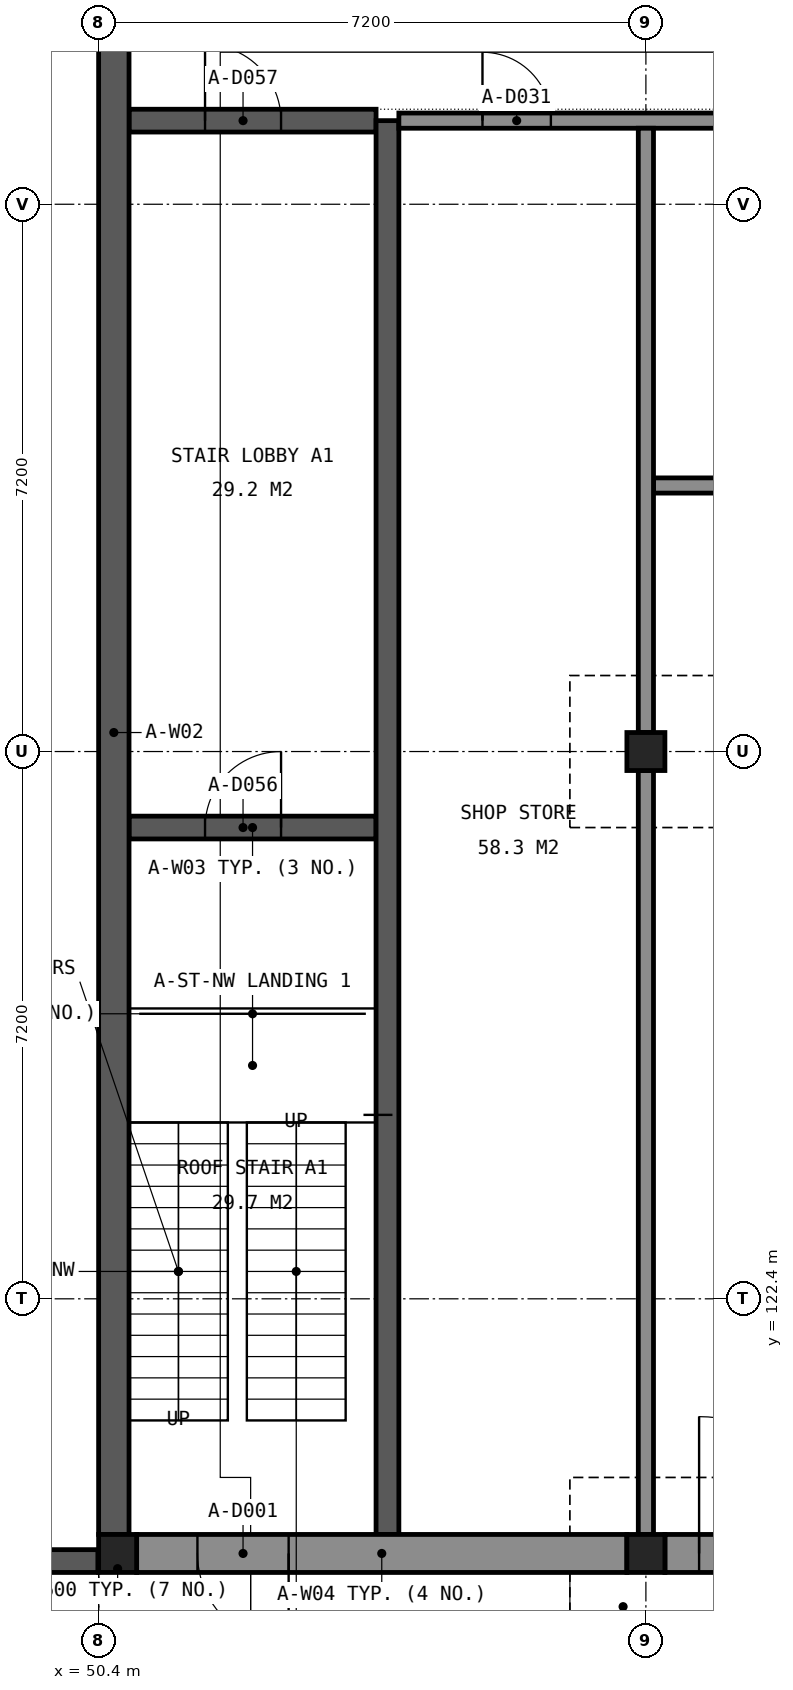
"""IFC4 building model, lengths in metres.
Left out: names, types, materials, properties, quantities, classifications, styles, units other than length and angle.
Written with IfcOpenShell. Run it as: python <this file> out.ifc"""

import sys

from ifc_helpers import new_model, si_unit, direction, frame, frame_2d, origin, origin_2d, place, context, subcontext, project, spatial, rectangle, extrude, element, fill, save


model = new_model("IFC4")
c1 = context("Model", 3, precision=1e-05, world=origin(), true_north=direction((0.0, 1.0)))
c2 = subcontext(c1, "Body", "Model", "MODEL_VIEW")
j1 = project(units=[si_unit("LENGTHUNIT", "METRE"), si_unit("PLANEANGLEUNIT", "RADIAN")], contexts=[c1])
p1 = place(None, origin())
s1 = spatial("IfcSite", under=j1, at=p1, CompositionType="ELEMENT")
p2 = place(p1, origin())
s2 = spatial("IfcBuilding", under=s1, at=p2, CompositionType="ELEMENT")
p3 = place(p2, origin())
s3 = spatial("IfcBuildingStorey", under=s2, at=p3, CompositionType="ELEMENT", Elevation=0.0)
for number, where, z_axis, x_axis in (
    (1, (50.65, 119.05, 0.0), (0.0, 0.0, 1.0), (1.0, 0.0, 0.0)),
    (2, (57.6, 119.05, 0.0), (0.0, 0.0, 1.0), (1.0, 0.0, 0.0)),
    (3, (57.6, 129.6, 0.0), (0.0, 0.0, 1.0), (1.0, 0.0, 0.0)),
):
    element("IfcColumn", number, at=place(p3, frame(where, z_axis=z_axis, x_axis=x_axis)), inside=s3, PredefinedType="COLUMN", context=c2, shape_type="SweptSolid", body=[
        extrude(rectangle(XDim=0.5, YDim=0.5, at=origin_2d()), origin(), (0.0, 0.0, 1.0), 3.7),
    ])
p4 = place(p3, frame((50.8, 128.6, 0.0), z_axis=(0.0, 0.0, 1.0), x_axis=(1.0, 0.0, 0.0)))
e4 = element("IfcWall", 4, at=p4, inside=s3, PredefinedType="SHEAR", context=c2, shape_type="SweptSolid", body=[
    extrude(rectangle(XDim=3.25, YDim=0.3, at=frame_2d((1.625, 0.0))), origin(), (0.0, 0.0, 1.0), 4.4),
])
p5 = place(p4, frame((1.0, 0.0, 0.0)))
e5 = element("IfcOpeningElement", 5, at=p5, cuts=e4, PredefinedType="OPENING", context=c2, shape_type="SweptSolid", body=[
    extrude(rectangle(XDim=1.0, YDim=2.1, at=frame_2d((0.5, 1.05))), frame((0.0, 0.16, 0.0), z_axis=(0.0, -1.0, 0.0), x_axis=(1.0, 0.0, 0.0)), (0.0, 0.0, 1.0), 0.32),
])
p6 = place(p3, frame((50.8, 137.9, 0.0), z_axis=(0.0, 0.0, 1.0), x_axis=(1.0, 0.0, 0.0)))
e6 = element("IfcWall", 6, at=p6, inside=s3, PredefinedType="SHEAR", context=c2, shape_type="SweptSolid", body=[
    extrude(rectangle(XDim=3.25, YDim=0.3, at=frame_2d((1.625, 0.0))), origin(), (0.0, 0.0, 1.0), 4.4),
])
p7 = place(p6, frame((1.0, 0.0, 0.0)))
e7 = element("IfcOpeningElement", 7, at=p7, cuts=e6, PredefinedType="OPENING", context=c2, shape_type="SweptSolid", body=[
    extrude(rectangle(XDim=1.0, YDim=2.1, at=frame_2d((0.5, 1.05))), frame((0.0, 0.16, 0.0), z_axis=(0.0, -1.0, 0.0), x_axis=(1.0, 0.0, 0.0)), (0.0, 0.0, 1.0), 0.32),
])
p8 = place(p3, frame((50.6, 119.3, 0.0), z_axis=(0.0, 0.0, 1.0), x_axis=(0.0, 1.0, 0.0)))
e8 = element("IfcWall", 8, at=p8, inside=s3, PredefinedType="SHEAR", context=c2, shape_type="SweptSolid", body=[
    extrude(rectangle(XDim=21.1, YDim=0.4, at=frame_2d((10.55, 0.0))), origin(), (0.0, 0.0, 1.0), 4.4),
])
p9 = place(p3, frame((54.2, 119.3, 0.0), z_axis=(0.0, 0.0, 1.0), x_axis=(0.0, 1.0, 0.0)))
e9 = element("IfcWall", 9, at=p9, inside=s3, PredefinedType="SHEAR", context=c2, shape_type="SweptSolid", body=[
    extrude(rectangle(XDim=18.6, YDim=0.3, at=frame_2d((9.3, 0.0))), origin(), (0.0, 0.0, 1.0), 4.4),
])
p10 = place(p3, frame((43.21, 118.95, -0.25), z_axis=(0.0, 0.0, 1.0), x_axis=(1.0, 0.0, 0.0)))
e10 = element("IfcWall", 10, at=p10, inside=s3, PredefinedType="SOLIDWALL", context=c2, shape_type="SweptSolid", body=[
    extrude(rectangle(XDim=7.18, YDim=0.3, at=frame_2d((3.59, 0.0))), origin(), (0.0, 0.0, 1.0), 6.15),
])
p11 = place(p3, frame((50.9, 119.05, 0.0), z_axis=(0.0, 0.0, 1.0), x_axis=(1.0, 0.0, 0.0)))
e11 = element("IfcWall", 11, at=p11, inside=s3, PredefinedType="SOLIDWALL", context=c2, shape_type="SweptSolid", body=[
    extrude(rectangle(XDim=6.45, YDim=0.5, at=frame_2d((3.225, 0.0))), origin(), (0.0, 0.0, 1.0), 3.6),
])
p12 = place(p11, frame((2.0, 0.0, 0.0), z_axis=(0.0, 0.0, 1.0), x_axis=(-1.0, 0.0, 0.0)))
e12 = element("IfcOpeningElement", 12, at=p12, cuts=e11, PredefinedType="OPENING", context=c2, shape_type="SweptSolid", body=[
    extrude(rectangle(XDim=1.2, YDim=2.1, at=frame_2d((0.6, 1.05))), frame((0.0, 0.26, 0.0), z_axis=(0.0, -1.0, 0.0), x_axis=(1.0, 0.0, 0.0)), (0.0, 0.0, 1.0), 0.52),
])
p13 = place(p3, frame((57.85, 119.05, 0.0), z_axis=(0.0, 0.0, 1.0), x_axis=(1.0, 0.0, 0.0)))
e13 = element("IfcWall", 13, at=p13, inside=s3, PredefinedType="SOLIDWALL", context=c2, shape_type="SweptSolid", body=[
    extrude(rectangle(XDim=6.7, YDim=0.5, at=frame_2d((3.35, 0.0))), origin(), (0.0, 0.0, 1.0), 3.6),
])
p14 = place(p13, frame((0.45, 0.0, 0.0)))
e14 = element("IfcOpeningElement", 14, at=p14, cuts=e13, PredefinedType="OPENING", context=c2, shape_type="SweptSolid", body=[
    extrude(rectangle(XDim=1.8, YDim=2.4, at=frame_2d((0.9, 1.2))), frame((0.0, 0.26, 0.0), z_axis=(0.0, -1.0, 0.0), x_axis=(1.0, 0.0, 0.0)), (0.0, 0.0, 1.0), 0.52),
])
p15 = place(p13, frame((2.6, 0.0, 0.6)))
e15 = element("IfcOpeningElement", 15, at=p15, cuts=e13, PredefinedType="OPENING", context=c2, shape_type="SweptSolid", body=[
    extrude(rectangle(XDim=3.0, YDim=2.4, at=frame_2d((1.5, 1.2))), frame((0.0, 0.26, 0.0), z_axis=(0.0, -1.0, 0.0), x_axis=(1.0, 0.0, 0.0)), (0.0, 0.0, 1.0), 0.52),
])
p16 = place(p3, frame((57.7, 133.1, 0.0), z_axis=(0.0, 0.0, 1.0), x_axis=(1.0, 0.0, 0.0)))
e16 = element("IfcWall", 16, at=p16, inside=s3, PredefinedType="PARTITIONING", context=c2, shape_type="SweptSolid", body=[
    extrude(rectangle(XDim=86.2, YDim=0.2, at=frame_2d((43.1, 0.0))), origin(), (0.0, 0.0, 1.0), 3.5),
])
p17 = place(p16, frame((3.0, 0.0, 0.0)))
e17 = element("IfcOpeningElement", 17, at=p17, cuts=e16, PredefinedType="OPENING", context=c2, shape_type="SweptSolid", body=[
    extrude(rectangle(XDim=1.0, YDim=2.1, at=frame_2d((0.5, 1.05))), frame((0.0, 0.11, 0.0), z_axis=(0.0, -1.0, 0.0), x_axis=(1.0, 0.0, 0.0)), (0.0, 0.0, 1.0), 0.22),
])
p18 = place(p16, frame((10.2, 0.0, 0.0)))
e18 = element("IfcOpeningElement", 18, at=p18, cuts=e16, PredefinedType="OPENING", context=c2, shape_type="SweptSolid", body=[
    extrude(rectangle(XDim=1.0, YDim=2.1, at=frame_2d((0.5, 1.05))), frame((0.0, 0.11, 0.0), z_axis=(0.0, -1.0, 0.0), x_axis=(1.0, 0.0, 0.0)), (0.0, 0.0, 1.0), 0.22),
])
p19 = place(p16, frame((17.4, 0.0, 0.0)))
e19 = element("IfcOpeningElement", 19, at=p19, cuts=e16, PredefinedType="OPENING", context=c2, shape_type="SweptSolid", body=[
    extrude(rectangle(XDim=1.0, YDim=2.1, at=frame_2d((0.5, 1.05))), frame((0.0, 0.11, 0.0), z_axis=(0.0, -1.0, 0.0), x_axis=(1.0, 0.0, 0.0)), (0.0, 0.0, 1.0), 0.22),
])
p20 = place(p16, frame((24.6, 0.0, 0.0)))
e20 = element("IfcOpeningElement", 20, at=p20, cuts=e16, PredefinedType="OPENING", context=c2, shape_type="SweptSolid", body=[
    extrude(rectangle(XDim=1.0, YDim=2.1, at=frame_2d((0.5, 1.05))), frame((0.0, 0.11, 0.0), z_axis=(0.0, -1.0, 0.0), x_axis=(1.0, 0.0, 0.0)), (0.0, 0.0, 1.0), 0.22),
])
p21 = place(p16, frame((31.8, 0.0, 0.0)))
e21 = element("IfcOpeningElement", 21, at=p21, cuts=e16, PredefinedType="OPENING", context=c2, shape_type="SweptSolid", body=[
    extrude(rectangle(XDim=1.0, YDim=2.1, at=frame_2d((0.5, 1.05))), frame((0.0, 0.11, 0.0), z_axis=(0.0, -1.0, 0.0), x_axis=(1.0, 0.0, 0.0)), (0.0, 0.0, 1.0), 0.22),
])
p22 = place(p16, frame((39.0, 0.0, 0.0)))
e22 = element("IfcOpeningElement", 22, at=p22, cuts=e16, PredefinedType="OPENING", context=c2, shape_type="SweptSolid", body=[
    extrude(rectangle(XDim=1.0, YDim=2.1, at=frame_2d((0.5, 1.05))), frame((0.0, 0.11, 0.0), z_axis=(0.0, -1.0, 0.0), x_axis=(1.0, 0.0, 0.0)), (0.0, 0.0, 1.0), 0.22),
])
p23 = place(p16, frame((46.2, 0.0, 0.0)))
e23 = element("IfcOpeningElement", 23, at=p23, cuts=e16, PredefinedType="OPENING", context=c2, shape_type="SweptSolid", body=[
    extrude(rectangle(XDim=1.0, YDim=2.1, at=frame_2d((0.5, 1.05))), frame((0.0, 0.11, 0.0), z_axis=(0.0, -1.0, 0.0), x_axis=(1.0, 0.0, 0.0)), (0.0, 0.0, 1.0), 0.22),
])
p24 = place(p16, frame((53.4, 0.0, 0.0)))
e24 = element("IfcOpeningElement", 24, at=p24, cuts=e16, PredefinedType="OPENING", context=c2, shape_type="SweptSolid", body=[
    extrude(rectangle(XDim=1.0, YDim=2.1, at=frame_2d((0.5, 1.05))), frame((0.0, 0.11, 0.0), z_axis=(0.0, -1.0, 0.0), x_axis=(1.0, 0.0, 0.0)), (0.0, 0.0, 1.0), 0.22),
])
p25 = place(p16, frame((60.6, 0.0, 0.0)))
e25 = element("IfcOpeningElement", 25, at=p25, cuts=e16, PredefinedType="OPENING", context=c2, shape_type="SweptSolid", body=[
    extrude(rectangle(XDim=1.0, YDim=2.1, at=frame_2d((0.5, 1.05))), frame((0.0, 0.11, 0.0), z_axis=(0.0, -1.0, 0.0), x_axis=(1.0, 0.0, 0.0)), (0.0, 0.0, 1.0), 0.22),
])
p26 = place(p16, frame((67.8, 0.0, 0.0)))
e26 = element("IfcOpeningElement", 26, at=p26, cuts=e16, PredefinedType="OPENING", context=c2, shape_type="SweptSolid", body=[
    extrude(rectangle(XDim=1.0, YDim=2.1, at=frame_2d((0.5, 1.05))), frame((0.0, 0.11, 0.0), z_axis=(0.0, -1.0, 0.0), x_axis=(1.0, 0.0, 0.0)), (0.0, 0.0, 1.0), 0.22),
])
p27 = place(p16, frame((75.0, 0.0, 0.0)))
e27 = element("IfcOpeningElement", 27, at=p27, cuts=e16, PredefinedType="OPENING", context=c2, shape_type="SweptSolid", body=[
    extrude(rectangle(XDim=1.0, YDim=2.1, at=frame_2d((0.5, 1.05))), frame((0.0, 0.11, 0.0), z_axis=(0.0, -1.0, 0.0), x_axis=(1.0, 0.0, 0.0)), (0.0, 0.0, 1.0), 0.22),
])
p28 = place(p16, frame((84.65, 0.0, 0.0)))
e28 = element("IfcOpeningElement", 28, at=p28, cuts=e16, PredefinedType="OPENING", context=c2, shape_type="SweptSolid", body=[
    extrude(rectangle(XDim=0.9, YDim=2.1, at=frame_2d((0.45, 1.05))), frame((0.0, 0.11, 0.0), z_axis=(0.0, -1.0, 0.0), x_axis=(1.0, 0.0, 0.0)), (0.0, 0.0, 1.0), 0.22),
])
p29 = place(p3, frame((54.35, 137.9, 0.0), z_axis=(0.0, 0.0, 1.0), x_axis=(1.0, 0.0, 0.0)))
e29 = element("IfcWall", 29, at=p29, inside=s3, PredefinedType="PARTITIONING", context=c2, shape_type="SweptSolid", body=[
    extrude(rectangle(XDim=92.9, YDim=0.2, at=frame_2d((46.45, 0.0))), origin(), (0.0, 0.0, 1.0), 3.5),
])
p30 = place(p29, frame((1.1, 0.0, 0.0)))
e30 = element("IfcOpeningElement", 30, at=p30, cuts=e29, PredefinedType="OPENING", context=c2, shape_type="SweptSolid", body=[
    extrude(rectangle(XDim=0.9, YDim=2.1, at=frame_2d((0.45, 1.05))), frame((0.0, 0.11, 0.0), z_axis=(0.0, -1.0, 0.0), x_axis=(1.0, 0.0, 0.0)), (0.0, 0.0, 1.0), 0.22),
])
p31 = place(p29, frame((90.9, 0.0, 0.0)))
e31 = element("IfcOpeningElement", 31, at=p31, cuts=e29, PredefinedType="OPENING", context=c2, shape_type="SweptSolid", body=[
    extrude(rectangle(XDim=0.9, YDim=2.1, at=frame_2d((0.45, 1.05))), frame((0.0, 0.11, 0.0), z_axis=(0.0, -1.0, 0.0), x_axis=(1.0, 0.0, 0.0)), (0.0, 0.0, 1.0), 0.22),
])
p32 = place(p29, frame((6.35, 0.0, 0.0)))
e32 = element("IfcOpeningElement", 32, at=p32, cuts=e29, PredefinedType="OPENING", context=c2, shape_type="SweptSolid", body=[
    extrude(rectangle(XDim=1.0, YDim=2.1, at=frame_2d((0.5, 1.05))), frame((0.0, 0.11, 0.0), z_axis=(0.0, -1.0, 0.0), x_axis=(1.0, 0.0, 0.0)), (0.0, 0.0, 1.0), 0.22),
])
p33 = place(p29, frame((13.55, 0.0, 0.0)))
e33 = element("IfcOpeningElement", 33, at=p33, cuts=e29, PredefinedType="OPENING", context=c2, shape_type="SweptSolid", body=[
    extrude(rectangle(XDim=1.0, YDim=2.1, at=frame_2d((0.5, 1.05))), frame((0.0, 0.11, 0.0), z_axis=(0.0, -1.0, 0.0), x_axis=(1.0, 0.0, 0.0)), (0.0, 0.0, 1.0), 0.22),
])
p34 = place(p29, frame((20.75, 0.0, 0.0)))
e34 = element("IfcOpeningElement", 34, at=p34, cuts=e29, PredefinedType="OPENING", context=c2, shape_type="SweptSolid", body=[
    extrude(rectangle(XDim=1.0, YDim=2.1, at=frame_2d((0.5, 1.05))), frame((0.0, 0.11, 0.0), z_axis=(0.0, -1.0, 0.0), x_axis=(1.0, 0.0, 0.0)), (0.0, 0.0, 1.0), 0.22),
])
p35 = place(p29, frame((27.95, 0.0, 0.0)))
e35 = element("IfcOpeningElement", 35, at=p35, cuts=e29, PredefinedType="OPENING", context=c2, shape_type="SweptSolid", body=[
    extrude(rectangle(XDim=1.0, YDim=2.1, at=frame_2d((0.5, 1.05))), frame((0.0, 0.11, 0.0), z_axis=(0.0, -1.0, 0.0), x_axis=(1.0, 0.0, 0.0)), (0.0, 0.0, 1.0), 0.22),
])
p36 = place(p29, frame((35.15, 0.0, 0.0)))
e36 = element("IfcOpeningElement", 36, at=p36, cuts=e29, PredefinedType="OPENING", context=c2, shape_type="SweptSolid", body=[
    extrude(rectangle(XDim=1.0, YDim=2.1, at=frame_2d((0.5, 1.05))), frame((0.0, 0.11, 0.0), z_axis=(0.0, -1.0, 0.0), x_axis=(1.0, 0.0, 0.0)), (0.0, 0.0, 1.0), 0.22),
])
p37 = place(p29, frame((42.35, 0.0, 0.0)))
e37 = element("IfcOpeningElement", 37, at=p37, cuts=e29, PredefinedType="OPENING", context=c2, shape_type="SweptSolid", body=[
    extrude(rectangle(XDim=1.0, YDim=2.1, at=frame_2d((0.5, 1.05))), frame((0.0, 0.11, 0.0), z_axis=(0.0, -1.0, 0.0), x_axis=(1.0, 0.0, 0.0)), (0.0, 0.0, 1.0), 0.22),
])
p38 = place(p29, frame((49.55, 0.0, 0.0)))
e38 = element("IfcOpeningElement", 38, at=p38, cuts=e29, PredefinedType="OPENING", context=c2, shape_type="SweptSolid", body=[
    extrude(rectangle(XDim=1.0, YDim=2.1, at=frame_2d((0.5, 1.05))), frame((0.0, 0.11, 0.0), z_axis=(0.0, -1.0, 0.0), x_axis=(1.0, 0.0, 0.0)), (0.0, 0.0, 1.0), 0.22),
])
p39 = place(p29, frame((56.75, 0.0, 0.0)))
e39 = element("IfcOpeningElement", 39, at=p39, cuts=e29, PredefinedType="OPENING", context=c2, shape_type="SweptSolid", body=[
    extrude(rectangle(XDim=1.0, YDim=2.1, at=frame_2d((0.5, 1.05))), frame((0.0, 0.11, 0.0), z_axis=(0.0, -1.0, 0.0), x_axis=(1.0, 0.0, 0.0)), (0.0, 0.0, 1.0), 0.22),
])
p40 = place(p29, frame((63.95, 0.0, 0.0)))
e40 = element("IfcOpeningElement", 40, at=p40, cuts=e29, PredefinedType="OPENING", context=c2, shape_type="SweptSolid", body=[
    extrude(rectangle(XDim=1.0, YDim=2.1, at=frame_2d((0.5, 1.05))), frame((0.0, 0.11, 0.0), z_axis=(0.0, -1.0, 0.0), x_axis=(1.0, 0.0, 0.0)), (0.0, 0.0, 1.0), 0.22),
])
p41 = place(p29, frame((71.15, 0.0, 0.0)))
e41 = element("IfcOpeningElement", 41, at=p41, cuts=e29, PredefinedType="OPENING", context=c2, shape_type="SweptSolid", body=[
    extrude(rectangle(XDim=1.0, YDim=2.1, at=frame_2d((0.5, 1.05))), frame((0.0, 0.11, 0.0), z_axis=(0.0, -1.0, 0.0), x_axis=(1.0, 0.0, 0.0)), (0.0, 0.0, 1.0), 0.22),
])
p42 = place(p29, frame((78.35, 0.0, 0.0)))
e42 = element("IfcOpeningElement", 42, at=p42, cuts=e29, PredefinedType="OPENING", context=c2, shape_type="SweptSolid", body=[
    extrude(rectangle(XDim=1.0, YDim=2.1, at=frame_2d((0.5, 1.05))), frame((0.0, 0.11, 0.0), z_axis=(0.0, -1.0, 0.0), x_axis=(1.0, 0.0, 0.0)), (0.0, 0.0, 1.0), 0.22),
])
p43 = place(p29, frame((85.55, 0.0, 0.0)))
e43 = element("IfcOpeningElement", 43, at=p43, cuts=e29, PredefinedType="OPENING", context=c2, shape_type="SweptSolid", body=[
    extrude(rectangle(XDim=1.0, YDim=2.1, at=frame_2d((0.5, 1.05))), frame((0.0, 0.11, 0.0), z_axis=(0.0, -1.0, 0.0), x_axis=(1.0, 0.0, 0.0)), (0.0, 0.0, 1.0), 0.22),
])
p44 = place(p3, frame((57.6, 119.3, 0.0), z_axis=(0.0, 0.0, 1.0), x_axis=(0.0, 1.0, 0.0)))
e44 = element("IfcWall", 44, at=p44, inside=s3, PredefinedType="PARTITIONING", context=c2, shape_type="SweptSolid", body=[
    extrude(rectangle(XDim=10.05, YDim=0.2, at=frame_2d((5.025, 0.0))), origin(), (0.0, 0.0, 1.0), 3.5),
])
p45 = place(p3, frame((57.6, 129.85, 0.0), z_axis=(0.0, 0.0, 1.0), x_axis=(0.0, 1.0, 0.0)))
e45 = element("IfcWall", 45, at=p45, inside=s3, PredefinedType="PARTITIONING", context=c2, shape_type="SweptSolid", body=[
    extrude(rectangle(XDim=7.95, YDim=0.2, at=frame_2d((3.975, 0.0))), origin(), (0.0, 0.0, 1.0), 3.5),
])
p46 = place(p12, origin())
e46 = element("IfcDoor", 46, at=p46, inside=s3, OperationType="SINGLE_SWING_LEFT", PredefinedType="DOOR", context=c2, shape_type="SweptSolid", body=[
    extrude(rectangle(XDim=1.2, YDim=2.1, at=frame_2d((0.6, 1.05))), frame((0.0, 0.025, 0.0), z_axis=(0.0, -1.0, 0.0), x_axis=(1.0, 0.0, 0.0)), (0.0, 0.0, 1.0), 0.05),
])
fill(e12, e46)
p47 = place(p14, origin())
e47 = element("IfcDoor", 47, at=p47, inside=s3, OperationType="DOUBLE_DOOR_DOUBLE_SWING", PredefinedType="DOOR", context=c2, shape_type="SweptSolid", body=[
    extrude(rectangle(XDim=1.8, YDim=2.4, at=frame_2d((0.9, 1.2))), frame((0.0, 0.025, 0.0), z_axis=(0.0, -1.0, 0.0), x_axis=(1.0, 0.0, 0.0)), (0.0, 0.0, 1.0), 0.05),
])
fill(e14, e47)
p48 = place(p30, origin())
e48 = element("IfcDoor", 48, at=p48, inside=s3, OperationType="SINGLE_SWING_LEFT", PredefinedType="DOOR", context=c2, shape_type="SweptSolid", body=[
    extrude(rectangle(XDim=0.9, YDim=2.1, at=frame_2d((0.45, 1.05))), frame((0.0, 0.025, 0.0), z_axis=(0.0, -1.0, 0.0), x_axis=(1.0, 0.0, 0.0)), (0.0, 0.0, 1.0), 0.05),
])
fill(e30, e48)
p49 = place(p5, origin())
e49 = element("IfcDoor", 49, at=p49, inside=s3, OperationType="SINGLE_SWING_RIGHT", PredefinedType="DOOR", context=c2, shape_type="SweptSolid", body=[
    extrude(rectangle(XDim=1.0, YDim=2.1, at=frame_2d((0.5, 1.05))), frame((0.0, 0.025, 0.0), z_axis=(0.0, -1.0, 0.0), x_axis=(1.0, 0.0, 0.0)), (0.0, 0.0, 1.0), 0.05),
])
fill(e5, e49)
p50 = place(p7, origin())
e50 = element("IfcDoor", 50, at=p50, inside=s3, OperationType="SINGLE_SWING_LEFT", PredefinedType="DOOR", context=c2, shape_type="SweptSolid", body=[
    extrude(rectangle(XDim=1.0, YDim=2.1, at=frame_2d((0.5, 1.05))), frame((0.0, 0.025, 0.0), z_axis=(0.0, -1.0, 0.0), x_axis=(1.0, 0.0, 0.0)), (0.0, 0.0, 1.0), 0.05),
])
fill(e7, e50)
save(model, sys.argv[1])
